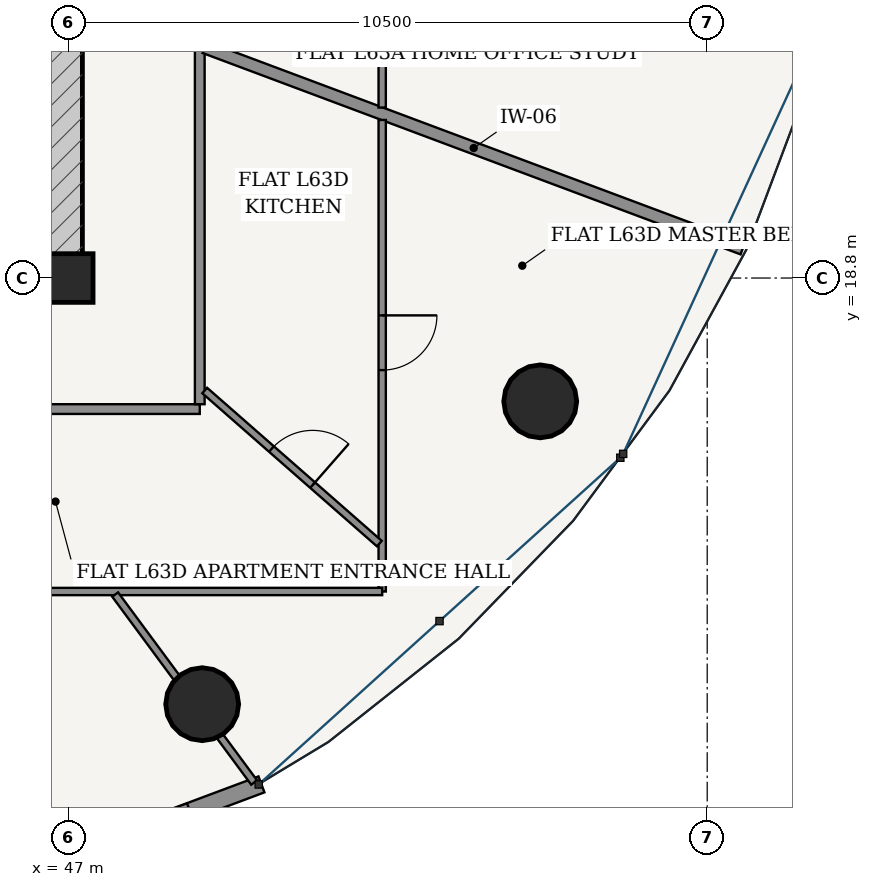
"""IFC4 building model, lengths in metres.
Left out: names, types, materials, properties, quantities, classifications, styles, units other than length and angle.
Written with IfcOpenShell. Run it as: python <this file> out.ifc"""

import sys

from ifc_helpers import new_model, si_unit, direction, frame, frame_2d, origin, origin_2d, place, context, subcontext, project, spatial, rectangle, hollow_circle, extrude, source, transform, mapped, element, fill, save


model = new_model("IFC4")
c1 = context("Model", 3, precision=1e-05, world=origin(), true_north=direction((-0.2419218956, 0.970295726276)))
c2 = subcontext(c1, "Body", "Model", "MODEL_VIEW")
j1 = project(units=[si_unit("LENGTHUNIT", "METRE"), si_unit("PLANEANGLEUNIT", "RADIAN")], contexts=[c1])
p1 = place(None, origin())
s1 = spatial("IfcSite", under=j1, at=p1, CompositionType="ELEMENT")
p2 = place(p1, origin())
s2 = spatial("IfcBuilding", under=s1, at=p2, CompositionType="ELEMENT")
p3 = place(p2, frame((0.0, 0.0, 239.3)))
s3 = spatial("IfcBuildingStorey", under=s2, at=p3, CompositionType="ELEMENT", Elevation=239.3)
p4 = place(p3, frame((47.0, 18.8, 0.0), z_axis=(0.0, 0.0, 1.0), x_axis=(1.0, 0.0, 0.0)))
e1 = element("IfcColumn", 1, at=p4, inside=s3, PredefinedType="COLUMN", context=c2, shape_type="SweptSolid", body=[
    extrude(rectangle(XDim=0.8, YDim=0.8, at=origin_2d()), origin(), (0.0, 0.0, 1.0), 3.7),
])
p5 = place(p3, frame((28.775, 18.875, 0.0), z_axis=(0.0, 0.0, 1.0), x_axis=(1.0, 0.0, 0.0)))
e2 = element("IfcWall", 2, at=p5, inside=s3, PredefinedType="SHEAR", context=c2, shape_type="SweptSolid", body=[
    extrude(rectangle(XDim=18.45, YDim=0.6, at=frame_2d((9.225, 0.0))), origin(), (0.0, 0.0, 1.0), 3.25),
])
p6 = place(p5, frame((6.76, 0.0, 0.0)))
e3 = element("IfcOpeningElement", 3, at=p6, cuts=e2, PredefinedType="OPENING", context=c2, shape_type="SweptSolid", body=[
    extrude(rectangle(XDim=0.85, YDim=2.1, at=frame_2d((0.425, 1.05))), frame((0.0, 0.31, 0.0), z_axis=(0.0, -1.0, 0.0), x_axis=(1.0, 0.0, 0.0)), (0.0, 0.0, 1.0), 0.62),
])
p7 = place(p5, frame((8.8, 0.0, 0.0)))
e4 = element("IfcOpeningElement", 4, at=p7, cuts=e2, PredefinedType="OPENING", context=c2, shape_type="SweptSolid", body=[
    extrude(rectangle(XDim=0.85, YDim=2.1, at=frame_2d((0.425, 1.05))), frame((0.0, 0.31, 0.0), z_axis=(0.0, -1.0, 0.0), x_axis=(1.0, 0.0, 0.0)), (0.0, 0.0, 1.0), 0.62),
])
p8 = place(p5, frame((10.84, 0.0, 0.0)))
e5 = element("IfcOpeningElement", 5, at=p8, cuts=e2, PredefinedType="OPENING", context=c2, shape_type="SweptSolid", body=[
    extrude(rectangle(XDim=0.85, YDim=2.1, at=frame_2d((0.425, 1.05))), frame((0.0, 0.31, 0.0), z_axis=(0.0, -1.0, 0.0), x_axis=(1.0, 0.0, 0.0)), (0.0, 0.0, 1.0), 0.62),
])
p9 = place(p3, frame((46.925, 19.175, 0.0), z_axis=(0.0, 0.0, 1.0), x_axis=(0.0, 1.0, 0.0)))
e6 = element("IfcWall", 6, at=p9, inside=s3, PredefinedType="SHEAR", context=c2, shape_type="SweptSolid", body=[
    extrude(rectangle(XDim=15.25, YDim=0.6, at=frame_2d((7.625, 0.0))), origin(), (0.0, 0.0, 1.0), 3.25),
])
p10 = place(p9, frame((9.875, 0.0, 0.0)))
e7 = element("IfcOpeningElement", 7, at=p10, cuts=e6, PredefinedType="OPENING", context=c2, shape_type="SweptSolid", body=[
    extrude(rectangle(XDim=1.5, YDim=2.2, at=frame_2d((0.75, 1.1))), frame((0.0, 0.31, 0.0), z_axis=(0.0, -1.0, 0.0), x_axis=(1.0, 0.0, 0.0)), (0.0, 0.0, 1.0), 0.62),
])
for number, where, z_axis, x_axis in (
    (8, (49.195, 11.792, 0.0), (0.0, 0.0, 1.0), (1.0, 0.0, 0.0)),
    (9, (54.754, 16.772, 0.0), (0.0, 0.0, 1.0), (1.0, 0.0, 0.0)),
):
    element("IfcColumn", number, at=place(p3, frame(where, z_axis=z_axis, x_axis=x_axis)), inside=s3, PredefinedType="COLUMN", context=c2, shape_type="SweptSolid", body=[
        extrude(hollow_circle(Radius=0.6, WallThickness=0.038, at=origin_2d()), origin(), (0.0, 0.0, 1.0), 3.7),
    ])
p11 = place(p3, frame((42.172, 7.48, 0.0), z_axis=(0.0, 0.0, 1.0), x_axis=(0.936556918375, 0.350515532672, 0.0)))
e10 = element("IfcWall", 10, at=p11, inside=s3, PredefinedType="SOLIDWALL", context=c2, shape_type="SweptSolid", body=[
    extrude(rectangle(XDim=8.539, YDim=0.28, at=frame_2d((4.27, 0.0))), origin(), (0.0, 0.0, 1.0), 3.25),
])
p12 = place(p11, frame((1.256, 0.0, 0.85)))
e11 = element("IfcOpeningElement", 11, at=p12, cuts=e10, PredefinedType="OPENING", context=c2, shape_type="SweptSolid", body=[
    extrude(rectangle(XDim=2.1, YDim=1.95, at=frame_2d((1.05, 0.975))), frame((0.0, 0.15, 0.0), z_axis=(0.0, -1.0, 0.0), x_axis=(1.0, 0.0, 0.0)), (0.0, 0.0, 1.0), 0.3),
])
p13 = place(p11, frame((5.184, 0.0, 0.85)))
e12 = element("IfcOpeningElement", 12, at=p13, cuts=e10, PredefinedType="OPENING", context=c2, shape_type="SweptSolid", body=[
    extrude(rectangle(XDim=2.1, YDim=1.95, at=frame_2d((1.05, 0.975))), frame((0.0, 0.15, 0.0), z_axis=(0.0, -1.0, 0.0), x_axis=(1.0, 0.0, 0.0)), (0.0, 0.0, 1.0), 0.3),
])
p14 = place(p3, frame((34.32, 16.645, 0.0), z_axis=(0.0, 0.0, 1.0), x_axis=(1.0, 0.0, 0.0)))
e13 = element("IfcWall", 13, at=p14, inside=s3, PredefinedType="PARTITIONING", context=c2, shape_type="SweptSolid", body=[
    extrude(rectangle(XDim=14.835, YDim=0.16, at=frame_2d((7.417, 0.0))), origin(), (0.0, 0.0, 1.0), 2.775),
])
p15 = place(p14, frame((9.928, 0.0, 0.0)))
e14 = element("IfcOpeningElement", 14, at=p15, cuts=e13, PredefinedType="OPENING", context=c2, shape_type="SweptSolid", body=[
    extrude(rectangle(XDim=0.98, YDim=2.2, at=frame_2d((0.49, 1.1))), frame((0.0, 0.09, 0.0), z_axis=(0.0, -1.0, 0.0), x_axis=(1.0, 0.0, 0.0)), (0.0, 0.0, 1.0), 0.18),
])
p16 = place(p3, frame((49.155, 16.725, 0.0), z_axis=(0.0, 0.0, 1.0), x_axis=(0.0, 1.0, 0.0)))
e15 = element("IfcWall", 15, at=p16, inside=s3, PredefinedType="PARTITIONING", context=c2, shape_type="SweptSolid", body=[
    extrude(rectangle(XDim=18.3, YDim=0.16, at=frame_2d((9.15, 0.0))), origin(), (0.0, 0.0, 1.0), 2.775),
])
p17 = place(p16, frame((7.401, 0.0, 0.0)))
e16 = element("IfcOpeningElement", 16, at=p17, cuts=e15, PredefinedType="OPENING", context=c2, shape_type="SweptSolid", body=[
    extrude(rectangle(XDim=0.98, YDim=2.2, at=frame_2d((0.49, 1.1))), frame((0.0, 0.09, 0.0), z_axis=(0.0, -1.0, 0.0), x_axis=(1.0, 0.0, 0.0)), (0.0, 0.0, 1.0), 0.18),
])
p18 = place(p3, frame((49.237, 22.594, 0.0), z_axis=(0.0, 0.0, 1.0), x_axis=(0.936534016635, -0.350576718687, 0.0)))
e17 = element("IfcWall", 17, at=p18, inside=s3, PredefinedType="PARTITIONING", context=c2, shape_type="SweptSolid", body=[
    extrude(rectangle(XDim=9.446, YDim=0.2, at=frame_2d((4.723, 0.0))), origin(), (0.0, 0.0, 1.0), 2.881),
])
p19 = place(p3, frame((52.155, 38.105, 0.0), z_axis=(0.0, 0.0, 1.0), x_axis=(0.0, -1.0, 0.0)))
e18 = element("IfcWall", 18, at=p19, inside=s3, PredefinedType="PARTITIONING", context=c2, shape_type="SweptSolid", body=[
    extrude(rectangle(XDim=16.501, YDim=0.12, at=frame_2d((8.251, 0.0))), origin(), (0.0, 0.0, 1.0), 2.775),
])
p20 = place(p19, frame((13.395, 0.0, 0.0)))
e19 = element("IfcOpeningElement", 19, at=p20, cuts=e18, PredefinedType="OPENING", context=c2, shape_type="SweptSolid", body=[
    extrude(rectangle(XDim=0.9, YDim=2.15, at=frame_2d((0.45, 1.075))), frame((0.0, 0.07, 0.0), z_axis=(0.0, -1.0, 0.0), x_axis=(1.0, 0.0, 0.0)), (0.0, 0.0, 1.0), 0.14),
])
p21 = place(p19, frame((7.467, 0.0, 0.0)))
e20 = element("IfcOpeningElement", 20, at=p21, cuts=e18, PredefinedType="OPENING", context=c2, shape_type="SweptSolid", body=[
    extrude(rectangle(XDim=0.9, YDim=2.15, at=frame_2d((0.45, 1.075))), frame((0.0, 0.07, 0.0), z_axis=(0.0, -1.0, 0.0), x_axis=(1.0, 0.0, 0.0)), (0.0, 0.0, 1.0), 0.14),
])
p22 = place(p3, frame((52.155, 21.4, 0.0), z_axis=(0.0, 0.0, 1.0), x_axis=(0.0, -1.0, 0.0)))
e21 = element("IfcWall", 21, at=p22, inside=s3, PredefinedType="PARTITIONING", context=c2, shape_type="SweptSolid", body=[
    extrude(rectangle(XDim=7.755, YDim=0.12, at=frame_2d((3.877, 0.0))), origin(), (0.0, 0.0, 1.0), 2.775),
])
p23 = place(p22, frame((3.214, 0.0, 0.0)))
e22 = element("IfcOpeningElement", 22, at=p23, cuts=e21, PredefinedType="OPENING", context=c2, shape_type="SweptSolid", body=[
    extrude(rectangle(XDim=0.9, YDim=2.15, at=frame_2d((0.45, 1.075))), frame((0.0, 0.07, 0.0), z_axis=(0.0, -1.0, 0.0), x_axis=(1.0, 0.0, 0.0)), (0.0, 0.0, 1.0), 0.14),
])
p24 = place(p3, frame((52.155, 13.645, 0.0), z_axis=(0.0, 0.0, 1.0), x_axis=(-1.0, 0.0, 0.0)))
e23 = element("IfcWall", 23, at=p24, inside=s3, PredefinedType="PARTITIONING", context=c2, shape_type="SweptSolid", body=[
    extrude(rectangle(XDim=16.949, YDim=0.12, at=frame_2d((8.474, 0.0))), origin(), (0.0, 0.0, 1.0), 2.775),
])
p25 = place(p24, frame((7.192, 0.0, 0.0)))
e24 = element("IfcOpeningElement", 24, at=p25, cuts=e23, PredefinedType="OPENING", context=c2, shape_type="SweptSolid", body=[
    extrude(rectangle(XDim=0.9, YDim=2.15, at=frame_2d((0.45, 1.075))), frame((0.0, 0.07, 0.0), z_axis=(0.0, -1.0, 0.0), x_axis=(1.0, 0.0, 0.0)), (0.0, 0.0, 1.0), 0.14),
])
p26 = place(p3, frame((47.764, 13.595, 0.0), z_axis=(0.0, 0.0, 1.0), x_axis=(0.594530312724, -0.804073197696, 0.0)))
e25 = element("IfcWall", 25, at=p26, inside=s3, PredefinedType="PARTITIONING", context=c2, shape_type="SweptSolid", body=[
    extrude(rectangle(XDim=3.845, YDim=0.12, at=frame_2d((1.922, 0.0))), origin(), (0.0, 0.0, 1.0), 2.6),
])
p27 = place(p3, frame((49.237, 16.95, 0.0), z_axis=(0.0, 0.0, 1.0), x_axis=(0.751994252696, -0.659169662463, 0.0)))
e26 = element("IfcWall", 26, at=p27, inside=s3, PredefinedType="PARTITIONING", context=c2, shape_type="SweptSolid", body=[
    extrude(rectangle(XDim=3.819, YDim=0.12, at=frame_2d((1.909, 0.0))), origin(), (0.0, 0.0, 1.0), 2.881),
])
p28 = place(p27, frame((1.459, 0.0, 0.0)))
e27 = element("IfcOpeningElement", 27, at=p28, cuts=e26, PredefinedType="OPENING", context=c2, shape_type="SweptSolid", body=[
    extrude(rectangle(XDim=0.9, YDim=2.15, at=frame_2d((0.45, 1.075))), frame((0.0, 0.07, 0.0), z_axis=(0.0, -1.0, 0.0), x_axis=(1.0, 0.0, 0.0)), (0.0, 0.0, 1.0), 0.14),
])
m1 = source(origin(), c2, "Body", "SweptSolid", [
    extrude(rectangle(XDim=0.9, YDim=2.15, at=frame_2d((0.45, 1.075))), frame((0.0, 0.025, 0.0), z_axis=(0.0, -1.0, 0.0), x_axis=(1.0, 0.0, 0.0)), (0.0, 0.0, 1.0), 0.05),
])
p29 = place(p28, origin())
e28 = element("IfcDoor", 28, at=p29, inside=s3, OperationType="SINGLE_SWING_RIGHT", PredefinedType="DOOR", context=c2, shape_type="MappedRepresentation", body=[
    mapped(m1, transform((0.0, 0.0, 0.0), scale=1.0)),
])
fill(e27, e28)
p30 = place(p23, origin())
e29 = element("IfcDoor", 29, at=p30, inside=s3, OperationType="SINGLE_SWING_LEFT", PredefinedType="DOOR", context=c2, shape_type="MappedRepresentation", body=[
    mapped(m1, transform((0.0, 0.0, 0.0), scale=1.0)),
])
fill(e22, e29)
save(model, sys.argv[1])
